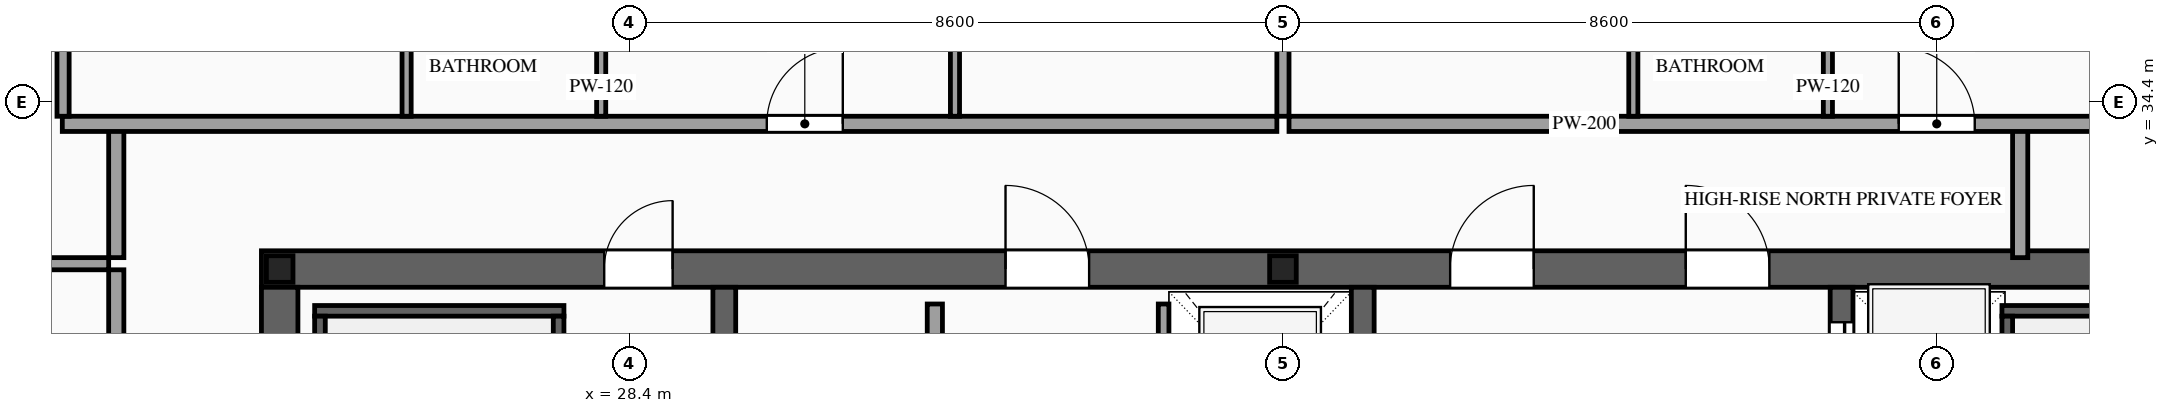
"""IFC4 building model, lengths in metres.
Left out: names, types, materials, properties, quantities, classifications, styles, units other than length and angle.
Written with IfcOpenShell. Run it as: python <this file> out.ifc"""

import sys

from ifc_helpers import new_model, si_unit, direction, frame, frame_2d, origin, origin_2d, place, context, subcontext, project, spatial, rectangle, i_section, extrude, source, transform, mapped, element, fill, save


model = new_model("IFC4")
c1 = context("Model", 3, precision=1e-05, world=origin(), true_north=direction((0.0, 1.0)))
c2 = subcontext(c1, "Body", "Model", "MODEL_VIEW")
j1 = project(units=[si_unit("LENGTHUNIT", "METRE"), si_unit("PLANEANGLEUNIT", "RADIAN")], contexts=[c1])
p1 = place(None, origin())
s1 = spatial("IfcSite", under=j1, at=p1, CompositionType="ELEMENT")
p2 = place(p1, origin())
s2 = spatial("IfcBuilding", under=s1, at=p2, CompositionType="ELEMENT")
p3 = place(p2, frame((0.0, 0.0, 303.1)))
s3 = spatial("IfcBuildingStorey", under=s2, at=p3, CompositionType="ELEMENT", Elevation=303.1)
p4 = place(p3, frame((23.56, 32.2, 0.0), z_axis=(0.0, 0.0, 1.0), x_axis=(1.0, 0.0, 0.0)))
e1 = element("IfcWall", 1, at=p4, inside=s3, PredefinedType="SHEAR", context=c2, shape_type="SweptSolid", body=[
    extrude(rectangle(XDim=26.88, YDim=0.48, at=frame_2d((13.44, 0.0))), origin(), (0.0, 0.0, 1.0), 3.5),
])
p5 = place(p4, frame((4.51, 0.0, 0.0)))
e2 = element("IfcOpeningElement", 2, at=p5, cuts=e1, PredefinedType="OPENING", context=c2, shape_type="SweptSolid", body=[
    extrude(rectangle(XDim=0.9, YDim=2.15, at=frame_2d((0.45, 1.075))), frame((0.0, 0.255, 0.0), z_axis=(0.0, -1.0, 0.0), x_axis=(1.0, 0.0, 0.0)), (0.0, 0.0, 1.0), 0.51),
])
p6 = place(p4, frame((9.79, 0.0, 0.0)))
e3 = element("IfcOpeningElement", 3, at=p6, cuts=e1, PredefinedType="OPENING", context=c2, shape_type="SweptSolid", body=[
    extrude(rectangle(XDim=1.1, YDim=2.2, at=frame_2d((0.55, 1.1))), frame((0.0, 0.255, 0.0), z_axis=(0.0, -1.0, 0.0), x_axis=(1.0, 0.0, 0.0)), (0.0, 0.0, 1.0), 0.51),
])
p7 = place(p4, frame((15.64, 0.0, 0.0)))
e4 = element("IfcOpeningElement", 4, at=p7, cuts=e1, PredefinedType="OPENING", context=c2, shape_type="SweptSolid", body=[
    extrude(rectangle(XDim=1.1, YDim=2.2, at=frame_2d((0.55, 1.1))), frame((0.0, 0.255, 0.0), z_axis=(0.0, -1.0, 0.0), x_axis=(1.0, 0.0, 0.0)), (0.0, 0.0, 1.0), 0.51),
])
p8 = place(p4, frame((18.74, 0.0, 0.0)))
e5 = element("IfcOpeningElement", 5, at=p8, cuts=e1, PredefinedType="OPENING", context=c2, shape_type="SweptSolid", body=[
    extrude(rectangle(XDim=1.1, YDim=2.2, at=frame_2d((0.55, 1.1))), frame((0.0, 0.255, 0.0), z_axis=(0.0, -1.0, 0.0), x_axis=(1.0, 0.0, 0.0)), (0.0, 0.0, 1.0), 0.51),
])
m1 = source(origin(), c2, "Body", "SweptSolid", [
    extrude(rectangle(XDim=12.32, YDim=0.48, at=frame_2d((6.16, 0.0))), origin(), (0.0, 0.0, 1.0), 3.5),
])
p9 = place(p3, frame((23.8, 19.64, 0.0), z_axis=(0.0, 0.0, 1.0), x_axis=(0.0, 1.0, 0.0)))
e6 = element("IfcWall", 6, at=p9, inside=s3, PredefinedType="SHEAR", context=c2, shape_type="MappedRepresentation", body=[
    mapped(m1, transform((0.0, 0.0, 0.0), scale=1.0)),
])
m2 = source(origin(), c2, "Body", "SweptSolid", [
    extrude(rectangle(XDim=12.32, YDim=0.3, at=frame_2d((6.16, 0.0))), origin(), (0.0, 0.0, 1.0), 3.5),
])
for number, where, z_axis, x_axis in (
    (7, (29.65, 19.64, 0.0), (0.0, 0.0, 1.0), (0.0, 1.0, 0.0)),
    (8, (38.05, 19.64, 0.0), (0.0, 0.0, 1.0), (0.0, 1.0, 0.0)),
):
    element("IfcWall", number, at=place(p3, frame(where, z_axis=z_axis, x_axis=x_axis)), inside=s3, PredefinedType="SOLIDWALL", context=c2, shape_type="MappedRepresentation", body=[
        mapped(m2, transform((0.0, 0.0, 0.0), scale=1.0)),
    ])
p10 = place(p3, frame((44.35, 19.64, 0.0), z_axis=(0.0, 0.0, 1.0), x_axis=(0.0, 1.0, 0.0)))
e9 = element("IfcWall", 9, at=p10, inside=s3, PredefinedType="SOLIDWALL", context=c2, shape_type="SweptSolid", body=[
    extrude(rectangle(XDim=12.32, YDim=0.3, at=frame_2d((6.16, 0.0))), origin(), (0.0, 0.0, 1.0), 3.5),
])
p11 = place(p10, frame((6.56, 0.0, 0.0)))
e10 = element("IfcOpeningElement", 10, at=p11, cuts=e9, PredefinedType="OPENING", context=c2, shape_type="SweptSolid", body=[
    extrude(rectangle(XDim=1.1, YDim=2.2, at=frame_2d((0.55, 1.1))), frame((0.0, 0.165, 0.0), z_axis=(0.0, -1.0, 0.0), x_axis=(1.0, 0.0, 0.0)), (0.0, 0.0, 1.0), 0.33),
])
p12 = place(p10, frame((8.66, 0.0, 0.0)))
e11 = element("IfcOpeningElement", 11, at=p12, cuts=e9, PredefinedType="OPENING", context=c2, shape_type="SweptSolid", body=[
    extrude(rectangle(XDim=1.1, YDim=2.2, at=frame_2d((0.55, 1.1))), frame((0.0, 0.165, 0.0), z_axis=(0.0, -1.0, 0.0), x_axis=(1.0, 0.0, 0.0)), (0.0, 0.0, 1.0), 0.33),
])
p13 = place(p10, frame((10.76, 0.0, 0.0)))
e12 = element("IfcOpeningElement", 12, at=p13, cuts=e9, PredefinedType="OPENING", context=c2, shape_type="SweptSolid", body=[
    extrude(rectangle(XDim=1.1, YDim=2.2, at=frame_2d((0.55, 1.1))), frame((0.0, 0.165, 0.0), z_axis=(0.0, -1.0, 0.0), x_axis=(1.0, 0.0, 0.0)), (0.0, 0.0, 1.0), 0.33),
])
m3 = source(origin(), c2, "Body", "SweptSolid", [
    extrude(i_section(OverallWidth=0.35, OverallDepth=0.35, WebThickness=0.012, FlangeThickness=0.019, at=origin_2d()), origin(), (0.0, 0.0, 1.0), 3.5),
])
for number, where, z_axis, x_axis in (
    (13, (23.8, 32.2, 0.0), (0.0, 0.0, 1.0), (1.0, 0.0, 0.0)),
    (14, (37.0, 32.2, 0.0), (0.0, 0.0, 1.0), (1.0, 0.0, 0.0)),
):
    element("IfcColumn", number, at=place(p3, frame(where, z_axis=z_axis, x_axis=x_axis)), inside=s3, PredefinedType="COLUMN", context=c2, shape_type="MappedRepresentation", body=[
        mapped(m3, transform((0.0, 0.0, 0.0), scale=1.0)),
    ])
p14 = place(p3, frame((35.43, 29.4, 0.0), z_axis=(0.0, 0.0, 1.0), x_axis=(0.0, 1.0, 0.0)))
e15 = element("IfcWall", 15, at=p14, inside=s3, PredefinedType="SOLIDWALL", context=c2, shape_type="SweptSolid", body=[
    extrude(rectangle(XDim=2.34, YDim=0.14, at=frame_2d((1.17, 0.0))), origin(), (0.0, 0.0, 1.0), 3.22),
])
p15 = place(p14, frame((0.62, 0.0, 0.0)))
e16 = element("IfcOpeningElement", 16, at=p15, cuts=e15, PredefinedType="OPENING", context=c2, shape_type="SweptSolid", body=[
    extrude(rectangle(XDim=1.1, YDim=2.2, at=frame_2d((0.55, 1.1))), frame((0.0, 0.085, 0.0), z_axis=(0.0, -1.0, 0.0), x_axis=(1.0, 0.0, 0.0)), (0.0, 0.0, 1.0), 0.17),
])
m4 = source(origin(), c2, "Body", "SweptSolid", [
    extrude(rectangle(XDim=3.28, YDim=0.14, at=frame_2d((1.64, 0.0))), origin(), (0.0, 0.0, 1.0), 3.22),
])
p16 = place(p3, frame((24.26, 31.65, 0.0), z_axis=(0.0, 0.0, 1.0), x_axis=(1.0, 0.0, 0.0)))
e17 = element("IfcWall", 17, at=p16, inside=s3, PredefinedType="SOLIDWALL", context=c2, shape_type="MappedRepresentation", body=[
    mapped(m4, transform((0.0, 0.0, 0.0), scale=1.0)),
])
m5 = source(origin(), c2, "Body", "SweptSolid", [
    extrude(rectangle(XDim=8.94, YDim=0.14, at=frame_2d((4.47, 0.0))), origin(), (0.0, 0.0, 1.0), 3.22),
])
for number, where, z_axis, x_axis in (
    (18, (24.33, 22.64, 0.0), (0.0, 0.0, 1.0), (0.0, 1.0, 0.0)),
    (19, (27.47, 22.64, 0.0), (0.0, 0.0, 1.0), (0.0, 1.0, 0.0)),
):
    element("IfcWall", number, at=place(p3, frame(where, z_axis=z_axis, x_axis=x_axis)), inside=s3, PredefinedType="SOLIDWALL", context=c2, shape_type="MappedRepresentation", body=[
        mapped(m5, transform((0.0, 0.0, 0.0), scale=1.0)),
    ])
p17 = place(p3, frame((46.46, 31.65, 0.0), z_axis=(0.0, 0.0, 1.0), x_axis=(1.0, 0.0, 0.0)))
e20 = element("IfcWall", 20, at=p17, inside=s3, PredefinedType="SOLIDWALL", context=c2, shape_type="MappedRepresentation", body=[
    mapped(m4, transform((0.0, 0.0, 0.0), scale=1.0)),
])
p18 = place(p3, frame((46.53, 22.64, 0.0), z_axis=(0.0, 0.0, 1.0), x_axis=(0.0, 1.0, 0.0)))
e21 = element("IfcWall", 21, at=p18, inside=s3, PredefinedType="SOLIDWALL", context=c2, shape_type="MappedRepresentation", body=[
    mapped(m5, transform((0.0, 0.0, 0.0), scale=1.0)),
])
p19 = place(p3, frame((32.42, 25.92, 0.0), z_axis=(0.0, 0.0, 1.0), x_axis=(0.0, 1.0, 0.0)))
e22 = element("IfcWall", 22, at=p19, inside=s3, PredefinedType="PARTITIONING", context=c2, shape_type="SweptSolid", body=[
    extrude(rectangle(XDim=5.82, YDim=0.2, at=frame_2d((2.91, 0.0))), origin(), (0.0, 0.0, 1.0), 3.22),
])
p20 = place(p19, frame((2.46, 0.0, 0.0)))
e23 = element("IfcOpeningElement", 23, at=p20, cuts=e22, PredefinedType="OPENING", context=c2, shape_type="SweptSolid", body=[
    extrude(rectangle(XDim=0.9, YDim=2.15, at=frame_2d((0.45, 1.075))), frame((0.0, 0.115, 0.0), z_axis=(0.0, -1.0, 0.0), x_axis=(1.0, 0.0, 0.0)), (0.0, 0.0, 1.0), 0.23),
])
m6 = source(origin(), c2, "Body", "SweptSolid", [
    extrude(rectangle(XDim=1.7, YDim=0.2, at=frame_2d((0.85, 0.0))), origin(), (0.0, 0.0, 1.0), 3.22),
])
for number, where, z_axis, x_axis in (
    (24, (21.65, 32.35, 0.0), (0.0, 0.0, 1.0), (0.0, 1.0, 0.0)),
    (25, (46.7, 32.35, 0.0), (0.0, 0.0, 1.0), (0.0, 1.0, 0.0)),
):
    element("IfcWall", number, at=place(p3, frame(where, z_axis=z_axis, x_axis=x_axis)), inside=s3, PredefinedType="PARTITIONING", context=c2, shape_type="MappedRepresentation", body=[
        mapped(m6, transform((0.0, 0.0, 0.0), scale=1.0)),
    ])
p21 = place(p3, frame((20.94, 34.11, 0.0), z_axis=(0.0, 0.0, 1.0), x_axis=(1.0, 0.0, 0.0)))
e26 = element("IfcWall", 26, at=p21, inside=s3, PredefinedType="PARTITIONING", context=c2, shape_type="SweptSolid", body=[
    extrude(rectangle(XDim=15.98, YDim=0.2, at=frame_2d((7.99, 0.0))), origin(), (0.0, 0.0, 1.0), 3.22),
])
p22 = place(p21, frame((9.269, 0.0, 0.0)))
e27 = element("IfcOpeningElement", 27, at=p22, cuts=e26, PredefinedType="OPENING", context=c2, shape_type="SweptSolid", body=[
    extrude(rectangle(XDim=1.0, YDim=2.2, at=frame_2d((0.5, 1.1))), frame((0.0, 0.115, 0.0), z_axis=(0.0, -1.0, 0.0), x_axis=(1.0, 0.0, 0.0)), (0.0, 0.0, 1.0), 0.23),
])
m7 = source(origin(), c2, "Body", "SweptSolid", [
    extrude(rectangle(XDim=10.54, YDim=0.16, at=frame_2d((5.27, 0.0))), origin(), (0.0, 0.0, 1.0), 2.727),
])
p23 = place(p3, frame((37.0, 34.21, 0.0), z_axis=(0.0, 0.0, 1.0), x_axis=(0.0, 1.0, 0.0)))
e28 = element("IfcWall", 28, at=p23, inside=s3, PredefinedType="PARTITIONING", context=c2, shape_type="MappedRepresentation", body=[
    mapped(m7, transform((0.0, 0.0, 0.0), scale=1.0)),
])
m8 = source(origin(), c2, "Body", "SweptSolid", [
    extrude(rectangle(XDim=2.9, YDim=0.12, at=frame_2d((1.45, 0.0))), origin(), (0.0, 0.0, 1.0), 3.22),
])
p24 = place(p3, frame((25.47, 34.21, 0.0), z_axis=(0.0, 0.0, 1.0), x_axis=(0.0, 1.0, 0.0)))
e29 = element("IfcWall", 29, at=p24, inside=s3, PredefinedType="PARTITIONING", context=c2, shape_type="MappedRepresentation", body=[
    mapped(m8, transform((0.0, 0.0, 0.0), scale=1.0)),
])
p25 = place(p3, frame((28.03, 34.21, 0.0), z_axis=(0.0, 0.0, 1.0), x_axis=(0.0, 1.0, 0.0)))
e30 = element("IfcWall", 30, at=p25, inside=s3, PredefinedType="PARTITIONING", context=c2, shape_type="SweptSolid", body=[
    extrude(rectangle(XDim=2.9, YDim=0.12, at=frame_2d((1.45, 0.0))), origin(), (0.0, 0.0, 1.0), 3.22),
])
p26 = place(p25, frame((1.025, 0.0, 0.0)))
e31 = element("IfcOpeningElement", 31, at=p26, cuts=e30, PredefinedType="OPENING", context=c2, shape_type="SweptSolid", body=[
    extrude(rectangle(XDim=0.85, YDim=2.1, at=frame_2d((0.425, 1.05))), frame((0.0, 0.075, 0.0), z_axis=(0.0, -1.0, 0.0), x_axis=(1.0, 0.0, 0.0)), (0.0, 0.0, 1.0), 0.15),
])
p27 = place(p3, frame((32.685, 34.21, 0.0), z_axis=(0.0, 0.0, 1.0), x_axis=(0.0, 1.0, 0.0)))
e32 = element("IfcWall", 32, at=p27, inside=s3, PredefinedType="PARTITIONING", context=c2, shape_type="MappedRepresentation", body=[
    mapped(m8, transform((0.0, 0.0, 0.0), scale=1.0)),
])
p28 = place(p3, frame((37.08, 34.11, 0.0), z_axis=(0.0, 0.0, 1.0), x_axis=(1.0, 0.0, 0.0)))
e33 = element("IfcWall", 33, at=p28, inside=s3, PredefinedType="PARTITIONING", context=c2, shape_type="SweptSolid", body=[
    extrude(rectangle(XDim=15.98, YDim=0.2, at=frame_2d((7.99, 0.0))), origin(), (0.0, 0.0, 1.0), 3.22),
])
p29 = place(p28, frame((8.022, 0.0, 0.0)))
e34 = element("IfcOpeningElement", 34, at=p29, cuts=e33, PredefinedType="OPENING", context=c2, shape_type="SweptSolid", body=[
    extrude(rectangle(XDim=1.0, YDim=2.2, at=frame_2d((0.5, 1.1))), frame((0.0, 0.115, 0.0), z_axis=(0.0, -1.0, 0.0), x_axis=(1.0, 0.0, 0.0)), (0.0, 0.0, 1.0), 0.23),
])
m9 = source(origin(), c2, "Body", "SweptSolid", [
    extrude(rectangle(XDim=10.39, YDim=0.16, at=frame_2d((5.195, 0.0))), origin(), (0.0, 0.0, 1.0), 3.22),
])
p30 = place(p3, frame((20.95, 34.21, 0.0), z_axis=(0.0, 0.0, 1.0), x_axis=(0.0, 1.0, 0.0)))
e35 = element("IfcWall", 35, at=p30, inside=s3, PredefinedType="PARTITIONING", context=c2, shape_type="MappedRepresentation", body=[
    mapped(m9, transform((0.0, 0.0, 0.0), scale=1.0)),
])
p31 = place(p3, frame((41.61, 34.21, 0.0), z_axis=(0.0, 0.0, 1.0), x_axis=(0.0, 1.0, 0.0)))
e36 = element("IfcWall", 36, at=p31, inside=s3, PredefinedType="PARTITIONING", context=c2, shape_type="MappedRepresentation", body=[
    mapped(m8, transform((0.0, 0.0, 0.0), scale=1.0)),
])
p32 = place(p3, frame((44.17, 34.21, 0.0), z_axis=(0.0, 0.0, 1.0), x_axis=(0.0, 1.0, 0.0)))
e37 = element("IfcWall", 37, at=p32, inside=s3, PredefinedType="PARTITIONING", context=c2, shape_type="SweptSolid", body=[
    extrude(rectangle(XDim=2.9, YDim=0.12, at=frame_2d((1.45, 0.0))), origin(), (0.0, 0.0, 1.0), 3.22),
])
p33 = place(p32, frame((1.025, 0.0, 0.0)))
e38 = element("IfcOpeningElement", 38, at=p33, cuts=e37, PredefinedType="OPENING", context=c2, shape_type="SweptSolid", body=[
    extrude(rectangle(XDim=0.85, YDim=2.1, at=frame_2d((0.425, 1.05))), frame((0.0, 0.075, 0.0), z_axis=(0.0, -1.0, 0.0), x_axis=(1.0, 0.0, 0.0)), (0.0, 0.0, 1.0), 0.15),
])
p34 = place(p3, frame((21.65, 19.41, 0.0), z_axis=(0.0, 0.0, 1.0), x_axis=(0.0, 1.0, 0.0)))
e39 = element("IfcWall", 39, at=p34, inside=s3, PredefinedType="PARTITIONING", context=c2, shape_type="SweptSolid", body=[
    extrude(rectangle(XDim=12.78, YDim=0.2, at=frame_2d((6.39, 0.0))), origin(), (0.0, 0.0, 1.0), 3.22),
])
p35 = place(p34, frame((5.89, 0.0, 0.0)))
e40 = element("IfcOpeningElement", 40, at=p35, cuts=e39, PredefinedType="OPENING", context=c2, shape_type="SweptSolid", body=[
    extrude(rectangle(XDim=1.0, YDim=2.2, at=frame_2d((0.5, 1.1))), frame((0.0, 0.115, 0.0), z_axis=(0.0, -1.0, 0.0), x_axis=(1.0, 0.0, 0.0)), (0.0, 0.0, 1.0), 0.23),
])
m10 = source(origin(), c2, "Body", "SweptSolid", [
    extrude(rectangle(XDim=3.5, YDim=0.16, at=frame_2d((1.75, 0.0))), origin(), (0.0, 0.0, 1.0), 2.765),
])
p36 = place(p3, frame((18.05, 32.27, 0.0), z_axis=(0.0, 0.0, 1.0), x_axis=(1.0, 0.0, 0.0)))
e41 = element("IfcWall", 41, at=p36, inside=s3, PredefinedType="PARTITIONING", context=c2, shape_type="MappedRepresentation", body=[
    mapped(m10, transform((0.0, 0.0, 0.0), scale=1.0)),
])
m11 = source(origin(), c2, "Body", "SweptSolid", [
    extrude(rectangle(XDim=1.1, YDim=2.2, at=frame_2d((0.55, 1.1))), frame((0.0, 0.025, 0.0), z_axis=(0.0, -1.0, 0.0), x_axis=(1.0, 0.0, 0.0)), (0.0, 0.0, 1.0), 0.05),
])
p37 = place(p13, origin())
e42 = element("IfcDoor", 42, at=p37, inside=s3, OperationType="SLIDING_TO_LEFT", PredefinedType="DOOR", context=c2, shape_type="MappedRepresentation", body=[
    mapped(m11, transform((0.0, 0.0, 0.0), scale=1.0)),
])
fill(e12, e42)
m12 = source(origin(), c2, "Body", "SweptSolid", [
    extrude(rectangle(XDim=0.9, YDim=2.15, at=frame_2d((0.45, 1.075))), frame((0.0, 0.025, 0.0), z_axis=(0.0, -1.0, 0.0), x_axis=(1.0, 0.0, 0.0)), (0.0, 0.0, 1.0), 0.05),
])
p38 = place(p5, origin())
e43 = element("IfcDoor", 43, at=p38, inside=s3, OperationType="SINGLE_SWING_RIGHT", PredefinedType="DOOR", context=c2, shape_type="MappedRepresentation", body=[
    mapped(m12, transform((0.0, 0.0, 0.0), scale=1.0)),
])
fill(e2, e43)
m13 = source(origin(), c2, "Body", "SweptSolid", [
    extrude(rectangle(XDim=1.1, YDim=2.2, at=frame_2d((0.55, 1.1))), frame((0.0, 0.025, 0.0), z_axis=(0.0, -1.0, 0.0), x_axis=(1.0, 0.0, 0.0)), (0.0, 0.0, 1.0), 0.05),
])
p39 = place(p6, origin())
e44 = element("IfcDoor", 44, at=p39, inside=s3, OperationType="SINGLE_SWING_LEFT", PredefinedType="DOOR", context=c2, shape_type="MappedRepresentation", body=[
    mapped(m13, transform((0.0, 0.0, 0.0), scale=1.0)),
])
fill(e3, e44)
p40 = place(p7, origin())
e45 = element("IfcDoor", 45, at=p40, inside=s3, OperationType="SINGLE_SWING_RIGHT", PredefinedType="DOOR", context=c2, shape_type="MappedRepresentation", body=[
    mapped(m13, transform((0.0, 0.0, 0.0), scale=1.0)),
])
fill(e4, e45)
p41 = place(p8, origin())
e46 = element("IfcDoor", 46, at=p41, inside=s3, OperationType="SINGLE_SWING_LEFT", PredefinedType="DOOR", context=c2, shape_type="MappedRepresentation", body=[
    mapped(m13, transform((0.0, 0.0, 0.0), scale=1.0)),
])
fill(e5, e46)
m14 = source(origin(), c2, "Body", "SweptSolid", [
    extrude(rectangle(XDim=1.0, YDim=2.2, at=frame_2d((0.5, 1.1))), frame((0.0, 0.025, 0.0), z_axis=(0.0, -1.0, 0.0), x_axis=(1.0, 0.0, 0.0)), (0.0, 0.0, 1.0), 0.05),
])
p42 = place(p22, origin())
e47 = element("IfcDoor", 47, at=p42, inside=s3, OperationType="SINGLE_SWING_RIGHT", PredefinedType="DOOR", context=c2, shape_type="MappedRepresentation", body=[
    mapped(m14, transform((0.0, 0.0, 0.0), scale=1.0)),
])
fill(e27, e47)
p43 = place(p29, origin())
e48 = element("IfcDoor", 48, at=p43, inside=s3, OperationType="SINGLE_SWING_LEFT", PredefinedType="DOOR", context=c2, shape_type="MappedRepresentation", body=[
    mapped(m14, transform((0.0, 0.0, 0.0), scale=1.0)),
])
fill(e34, e48)
save(model, sys.argv[1])
